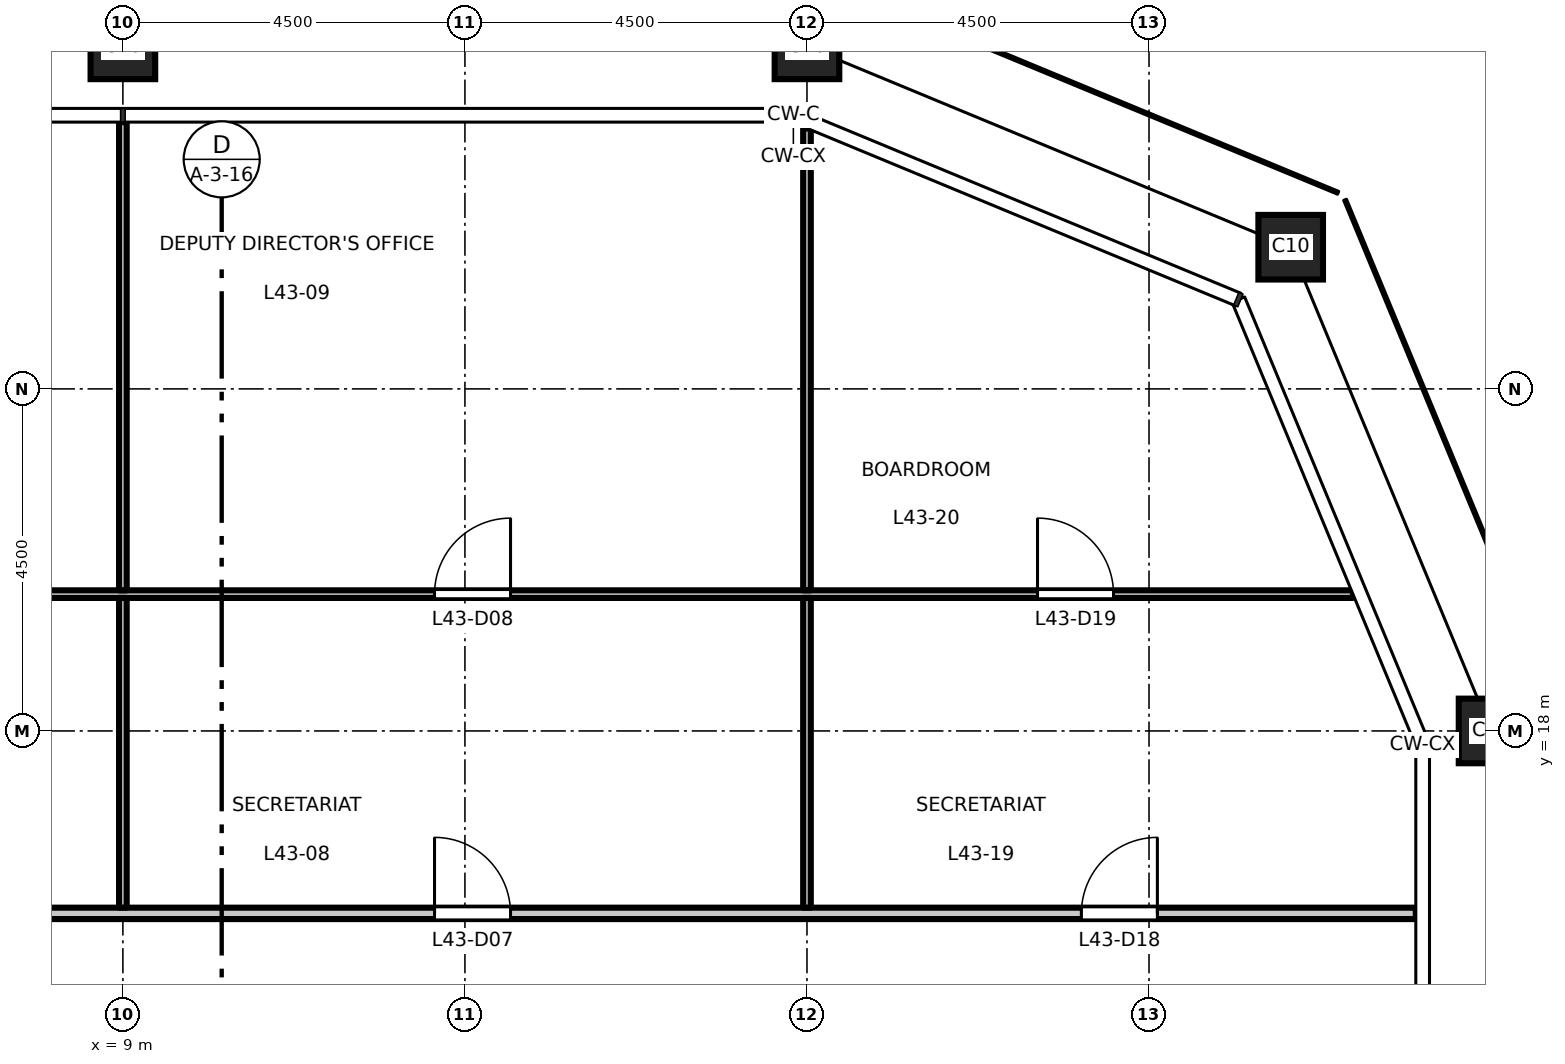
"""IFC4 building model, lengths in metres.
Left out: names, types, materials, properties, quantities, classifications, styles, units other than length and angle.
Written with IfcOpenShell. Run it as: python <this file> out.ifc"""

import sys

from ifc_helpers import new_model, si_unit, direction, frame, frame_2d, origin, origin_2d, place, context, subcontext, project, spatial, rectangle, hollow_rectangle, extrude, element, fill, save


model = new_model("IFC4")
c1 = context("Model", 3, precision=1e-05, world=origin(), true_north=direction((0.0, 1.0)))
c2 = subcontext(c1, "Body", "Model", "MODEL_VIEW")
j1 = project(units=[si_unit("LENGTHUNIT", "METRE"), si_unit("PLANEANGLEUNIT", "RADIAN")], contexts=[c1])
p1 = place(None, origin())
s1 = spatial("IfcSite", under=j1, at=p1, CompositionType="ELEMENT")
p2 = place(p1, origin())
s2 = spatial("IfcBuilding", under=s1, at=p2, CompositionType="ELEMENT")
p3 = place(p2, frame((0.0, 0.0, 201.7)))
s3 = spatial("IfcBuildingStorey", under=s2, at=p3, CompositionType="ELEMENT", Elevation=201.7)
for number, where, z_axis, x_axis in (
    (1, (27.0, 18.0, 0.0), (0.0, 0.0, 1.0), (1.0, 0.0, 0.0)),
    (2, (24.364, 24.364, 0.0), (0.0, 0.0, 1.0), (1.0, 0.0, 0.0)),
    (3, (18.0, 27.0, 0.0), (0.0, 0.0, 1.0), (1.0, 0.0, 0.0)),
    (4, (9.0, 27.0, 0.0), (0.0, 0.0, 1.0), (1.0, 0.0, 0.0)),
):
    element("IfcColumn", number, at=place(p3, frame(where, z_axis=z_axis, x_axis=x_axis)), inside=s3, PredefinedType="COLUMN", context=c2, shape_type="SweptSolid", body=[
        extrude(hollow_rectangle(XDim=0.85, YDim=0.85, WallThickness=0.05, at=origin_2d()), origin(), (0.0, 0.0, 1.0), 4.5),
    ])
p4 = place(p3, frame((-26.01, 15.6, 0.0), z_axis=(0.0, 0.0, 1.0), x_axis=(1.0, 0.0, 0.0)))
e5 = element("IfcWall", 5, at=p4, inside=s3, PredefinedType="PARTITIONING", context=c2, shape_type="SweptSolid", body=[
    extrude(rectangle(XDim=52.02, YDim=0.15, at=frame_2d((26.01, 0.0))), origin(), (0.0, 0.0, 1.0), 4.35),
])
p5 = place(p4, frame((12.11, 0.0, 0.0)))
e6 = element("IfcOpeningElement", 6, at=p5, cuts=e5, PredefinedType="OPENING", context=c2, shape_type="SweptSolid", body=[
    extrude(rectangle(XDim=1.0, YDim=2.1, at=frame_2d((0.5, 1.05))), frame((0.0, 0.085, 0.0), z_axis=(0.0, -1.0, 0.0), x_axis=(1.0, 0.0, 0.0)), (0.0, 0.0, 1.0), 0.17),
])
p6 = place(p4, frame((21.11, 0.0, 0.0)))
e7 = element("IfcOpeningElement", 7, at=p6, cuts=e5, PredefinedType="OPENING", context=c2, shape_type="SweptSolid", body=[
    extrude(rectangle(XDim=1.0, YDim=2.1, at=frame_2d((0.5, 1.05))), frame((0.0, 0.085, 0.0), z_axis=(0.0, -1.0, 0.0), x_axis=(1.0, 0.0, 0.0)), (0.0, 0.0, 1.0), 0.17),
])
p7 = place(p4, frame((27.86, 0.0, 0.0)))
e8 = element("IfcOpeningElement", 8, at=p7, cuts=e5, PredefinedType="OPENING", context=c2, shape_type="SweptSolid", body=[
    extrude(rectangle(XDim=1.0, YDim=2.1, at=frame_2d((0.5, 1.05))), frame((0.0, 0.085, 0.0), z_axis=(0.0, -1.0, 0.0), x_axis=(1.0, 0.0, 0.0)), (0.0, 0.0, 1.0), 0.17),
])
p8 = place(p4, frame((32.36, 0.0, 0.0)))
e9 = element("IfcOpeningElement", 9, at=p8, cuts=e5, PredefinedType="OPENING", context=c2, shape_type="SweptSolid", body=[
    extrude(rectangle(XDim=1.0, YDim=2.1, at=frame_2d((0.5, 1.05))), frame((0.0, 0.085, 0.0), z_axis=(0.0, -1.0, 0.0), x_axis=(1.0, 0.0, 0.0)), (0.0, 0.0, 1.0), 0.17),
])
p9 = place(p4, frame((39.11, 0.0, 0.0)))
e10 = element("IfcOpeningElement", 10, at=p9, cuts=e5, PredefinedType="OPENING", context=c2, shape_type="SweptSolid", body=[
    extrude(rectangle(XDim=1.0, YDim=2.1, at=frame_2d((0.5, 1.05))), frame((0.0, 0.085, 0.0), z_axis=(0.0, -1.0, 0.0), x_axis=(1.0, 0.0, 0.0)), (0.0, 0.0, 1.0), 0.17),
])
p10 = place(p4, frame((3.61, 0.0, 0.0)))
e11 = element("IfcOpeningElement", 11, at=p10, cuts=e5, PredefinedType="OPENING", context=c2, shape_type="SweptSolid", body=[
    extrude(rectangle(XDim=1.0, YDim=2.1, at=frame_2d((0.5, 1.05))), frame((0.0, 0.085, 0.0), z_axis=(0.0, -1.0, 0.0), x_axis=(1.0, 0.0, 0.0)), (0.0, 0.0, 1.0), 0.17),
])
p11 = place(p4, frame((47.62, 0.0, 0.0)))
e12 = element("IfcOpeningElement", 12, at=p11, cuts=e5, PredefinedType="OPENING", context=c2, shape_type="SweptSolid", body=[
    extrude(rectangle(XDim=1.0, YDim=2.1, at=frame_2d((0.5, 1.05))), frame((0.0, 0.085, 0.0), z_axis=(0.0, -1.0, 0.0), x_axis=(1.0, 0.0, 0.0)), (0.0, 0.0, 1.0), 0.17),
])
p12 = place(p3, frame((-8.95, 19.8, 0.0), z_axis=(0.0, 0.0, 1.0), x_axis=(1.0, 0.0, 0.0)))
e13 = element("IfcWall", 13, at=p12, inside=s3, PredefinedType="PARTITIONING", context=c2, shape_type="SweptSolid", body=[
    extrude(rectangle(XDim=34.133, YDim=0.1, at=frame_2d((17.066, 0.0))), origin(), (0.0, 0.0, 1.0), 4.35),
])
p13 = place(p12, frame((4.05, 0.0, 0.0)))
e14 = element("IfcOpeningElement", 14, at=p13, cuts=e13, PredefinedType="OPENING", context=c2, shape_type="SweptSolid", body=[
    extrude(rectangle(XDim=1.0, YDim=2.1, at=frame_2d((0.5, 1.05))), frame((0.0, 0.06, 0.0), z_axis=(0.0, -1.0, 0.0), x_axis=(1.0, 0.0, 0.0)), (0.0, 0.0, 1.0), 0.12),
])
p14 = place(p12, frame((10.8, 0.0, 0.0)))
e15 = element("IfcOpeningElement", 15, at=p14, cuts=e13, PredefinedType="OPENING", context=c2, shape_type="SweptSolid", body=[
    extrude(rectangle(XDim=1.0, YDim=2.1, at=frame_2d((0.5, 1.05))), frame((0.0, 0.06, 0.0), z_axis=(0.0, -1.0, 0.0), x_axis=(1.0, 0.0, 0.0)), (0.0, 0.0, 1.0), 0.12),
])
p15 = place(p12, frame((22.05, 0.0, 0.0)))
e16 = element("IfcOpeningElement", 16, at=p15, cuts=e13, PredefinedType="OPENING", context=c2, shape_type="SweptSolid", body=[
    extrude(rectangle(XDim=1.0, YDim=2.1, at=frame_2d((0.5, 1.05))), frame((0.0, 0.06, 0.0), z_axis=(0.0, -1.0, 0.0), x_axis=(1.0, 0.0, 0.0)), (0.0, 0.0, 1.0), 0.12),
])
p16 = place(p12, frame((29.983, 0.0, 0.0)))
e17 = element("IfcOpeningElement", 17, at=p16, cuts=e13, PredefinedType="OPENING", context=c2, shape_type="SweptSolid", body=[
    extrude(rectangle(XDim=1.0, YDim=2.1, at=frame_2d((0.5, 1.05))), frame((0.0, 0.06, 0.0), z_axis=(0.0, -1.0, 0.0), x_axis=(1.0, 0.0, 0.0)), (0.0, 0.0, 1.0), 0.12),
])
p17 = place(p3, frame((9.0, 15.675, 0.0), z_axis=(0.0, 0.0, 1.0), x_axis=(0.0, 1.0, 0.0)))
e18 = element("IfcWall", 18, at=p17, inside=s3, PredefinedType="PARTITIONING", context=c2, shape_type="SweptSolid", body=[
    extrude(rectangle(XDim=4.075, YDim=0.1, at=frame_2d((2.038, 0.0))), origin(), (0.0, 0.0, 1.0), 3.65),
])
p18 = place(p3, frame((9.0, 19.85, 0.0), z_axis=(0.0, 0.0, 1.0), x_axis=(0.0, 1.0, 0.0)))
e19 = element("IfcWall", 19, at=p18, inside=s3, PredefinedType="PARTITIONING", context=c2, shape_type="SweptSolid", body=[
    extrude(rectangle(XDim=6.16, YDim=0.1, at=frame_2d((3.08, 0.0))), origin(), (0.0, 0.0, 1.0), 3.65),
])
p19 = place(p3, frame((18.0, 15.675, 0.0), z_axis=(0.0, 0.0, 1.0), x_axis=(0.0, 1.0, 0.0)))
e20 = element("IfcWall", 20, at=p19, inside=s3, PredefinedType="PARTITIONING", context=c2, shape_type="SweptSolid", body=[
    extrude(rectangle(XDim=4.075, YDim=0.1, at=frame_2d((2.038, 0.0))), origin(), (0.0, 0.0, 1.0), 3.65),
])
p20 = place(p3, frame((18.0, 19.85, 0.0), z_axis=(0.0, 0.0, 1.0), x_axis=(0.0, 1.0, 0.0)))
e21 = element("IfcWall", 21, at=p20, inside=s3, PredefinedType="PARTITIONING", context=c2, shape_type="SweptSolid", body=[
    extrude(rectangle(XDim=6.078, YDim=0.1, at=frame_2d((3.039, 0.0))), origin(), (0.0, 0.0, 1.0), 3.65),
])
p21 = place(p9, origin())
e22 = element("IfcDoor", 22, at=p21, inside=s3, OperationType="SINGLE_SWING_LEFT", PredefinedType="DOOR", context=c2, shape_type="SweptSolid", body=[
    extrude(rectangle(XDim=1.0, YDim=2.1, at=frame_2d((0.5, 1.05))), frame((0.0, 0.025, 0.0), z_axis=(0.0, -1.0, 0.0), x_axis=(1.0, 0.0, 0.0)), (0.0, 0.0, 1.0), 0.05),
])
fill(e10, e22)
p22 = place(p15, origin())
e23 = element("IfcDoor", 23, at=p22, inside=s3, OperationType="SINGLE_SWING_RIGHT", PredefinedType="DOOR", context=c2, shape_type="SweptSolid", body=[
    extrude(rectangle(XDim=1.0, YDim=2.1, at=frame_2d((0.5, 1.05))), frame((0.0, 0.025, 0.0), z_axis=(0.0, -1.0, 0.0), x_axis=(1.0, 0.0, 0.0)), (0.0, 0.0, 1.0), 0.05),
])
fill(e16, e23)
p23 = place(p11, origin())
e24 = element("IfcDoor", 24, at=p23, inside=s3, OperationType="SINGLE_SWING_RIGHT", PredefinedType="DOOR", context=c2, shape_type="SweptSolid", body=[
    extrude(rectangle(XDim=1.0, YDim=2.1, at=frame_2d((0.5, 1.05))), frame((0.0, 0.025, 0.0), z_axis=(0.0, -1.0, 0.0), x_axis=(1.0, 0.0, 0.0)), (0.0, 0.0, 1.0), 0.05),
])
fill(e12, e24)
p24 = place(p16, origin())
e25 = element("IfcDoor", 25, at=p24, inside=s3, OperationType="SINGLE_SWING_LEFT", PredefinedType="DOOR", context=c2, shape_type="SweptSolid", body=[
    extrude(rectangle(XDim=1.0, YDim=2.1, at=frame_2d((0.5, 1.05))), frame((0.0, 0.025, 0.0), z_axis=(0.0, -1.0, 0.0), x_axis=(1.0, 0.0, 0.0)), (0.0, 0.0, 1.0), 0.05),
])
fill(e17, e25)
save(model, sys.argv[1])
